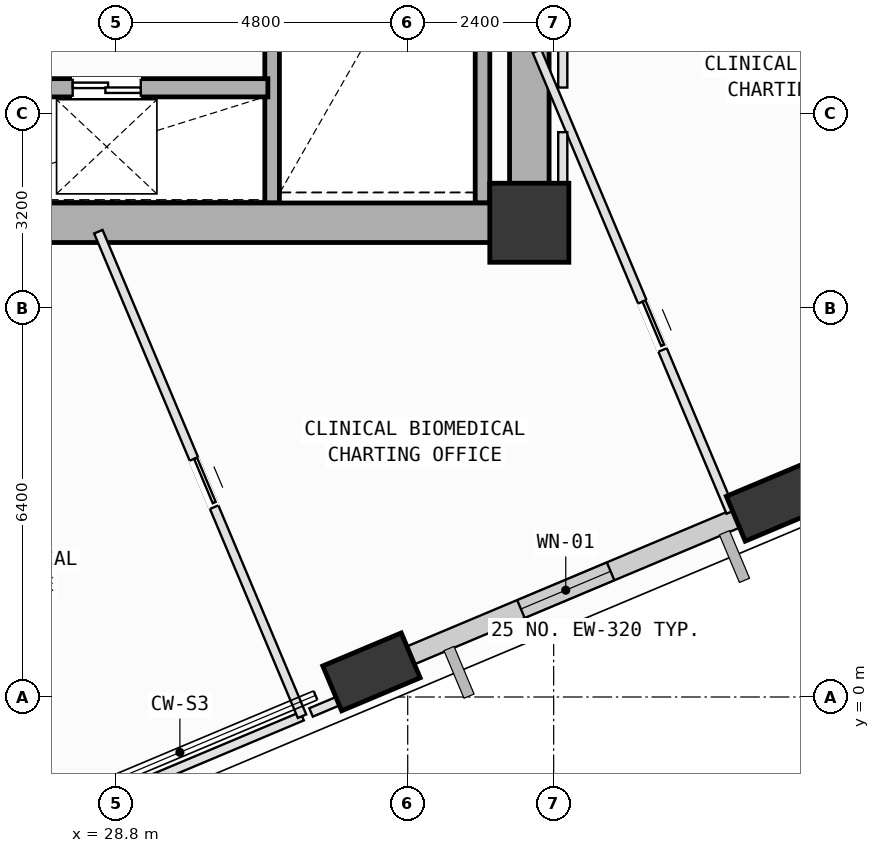
"""IFC4 building model, lengths in metres.
Left out: names, types, materials, properties, quantities, classifications, styles, units other than length and angle.
Written with IfcOpenShell. Run it as: python <this file> out.ifc"""

import sys

from ifc_helpers import new_model, si_unit, direction, frame, frame_2d, origin, origin_2d, place, context, subcontext, project, spatial, rectangle, extrude, element, fill, save


model = new_model("IFC4")
c1 = context("Model", 3, precision=1e-05, world=origin(), true_north=direction((0.0, 1.0)))
c2 = subcontext(c1, "Body", "Model", "MODEL_VIEW")
j1 = project(units=[si_unit("LENGTHUNIT", "METRE"), si_unit("PLANEANGLEUNIT", "RADIAN")], contexts=[c1])
p1 = place(None, origin())
s1 = spatial("IfcSite", under=j1, at=p1, CompositionType="ELEMENT")
p2 = place(p1, origin())
s2 = spatial("IfcBuilding", under=s1, at=p2, CompositionType="ELEMENT")
p3 = place(p2, frame((0.0, 0.0, 120.4)))
s3 = spatial("IfcBuildingStorey", under=s2, at=p3, CompositionType="ELEMENT", Elevation=120.4)
p4 = place(p3, frame((35.6, 7.8, 0.0), z_axis=(0.0, 0.0, 1.0), x_axis=(1.0, 0.0, 0.0)))
e1 = element("IfcColumn", 1, at=p4, inside=s3, PredefinedType="COLUMN", context=c2, shape_type="SweptSolid", body=[
    extrude(rectangle(XDim=1.3, YDim=1.3, at=origin_2d()), origin(), (0.0, 0.0, 1.0), 4.0),
])
p5 = place(p3, frame((33.004, 0.413, 0.002), z_axis=(0.100592771418, -0.001641090531, 0.994926329514), x_axis=(-0.370460704435, 0.928029591596, 0.038986453956)))
e2 = element("IfcColumn", 2, at=p5, inside=s3, PredefinedType="COLUMN", context=c2, shape_type="SweptSolid", body=[
    extrude(rectangle(XDim=1.4, YDim=0.8, at=origin_2d()), origin(), (0.0, 0.0, 1.0), 4.017),
])
p6 = place(p3, frame((39.641, 3.204, 0.002), z_axis=(0.08893172908, 0.025669760377, 0.995706890086), x_axis=(-0.626372223707, 0.778698418388, 0.035869354176)))
e3 = element("IfcColumn", 3, at=p6, inside=s3, PredefinedType="COLUMN", context=c2, shape_type="SweptSolid", body=[
    extrude(rectangle(XDim=1.4, YDim=0.8, at=origin_2d()), origin(), (0.0, 0.0, 1.0), 4.014),
])
p7 = place(p3, frame((39.354, 3.083, 0.0), z_axis=(0.0, 0.0, 1.0), x_axis=(-0.921860032261, -0.387523006956, 0.0)))
e4 = element("IfcWall", 4, at=p7, inside=s3, PredefinedType="SOLIDWALL", context=c2, shape_type="SweptSolid", body=[
    extrude(rectangle(XDim=6.214, YDim=0.32, at=frame_2d((3.107, 0.0))), origin(), (0.0, 0.0, 1.0), 3.165),
])
p8 = place(p7, frame((2.622, 0.0, 0.75)))
e5 = element("IfcOpeningElement", 5, at=p8, cuts=e4, PredefinedType="OPENING", context=c2, shape_type="SweptSolid", body=[
    extrude(rectangle(XDim=1.6, YDim=1.95, at=frame_2d((0.8, 0.975))), frame((0.0, 0.17, 0.0), z_axis=(0.0, -1.0, 0.0), x_axis=(1.0, 0.0, 0.0)), (0.0, 0.0, 1.0), 0.34),
])
for number, where, z_axis, x_axis in (
    (6, (34.83, 15.12, 0.0), (0.0, 0.0, 1.0), (0.0, -1.0, 0.0)),
    (7, (31.37, 8.125, 0.0), (0.0, 0.0, 1.0), (0.0, 1.0, 0.0)),
):
    element("IfcWall", number, at=place(p3, frame(where, z_axis=z_axis, x_axis=x_axis)), inside=s3, PredefinedType="SOLIDWALL", context=c2, shape_type="SweptSolid", body=[
        extrude(rectangle(XDim=6.995, YDim=0.24, at=frame_2d((3.498, 0.0))), origin(), (0.0, 0.0, 1.0), 3.78),
    ])
p9 = place(p3, frame((24.8, 7.8, 0.0), z_axis=(0.0, 0.0, 1.0), x_axis=(1.0, 0.0, 0.0)))
e8 = element("IfcWall", 8, at=p9, inside=s3, PredefinedType="SHEAR", context=c2, shape_type="SweptSolid", body=[
    extrude(rectangle(XDim=10.8, YDim=0.65, at=frame_2d((5.4, 0.0))), origin(), (0.0, 0.0, 1.0), 3.78),
])
p10 = place(p3, frame((35.6, 7.8, 0.0), z_axis=(0.0, 0.0, 1.0), x_axis=(0.0, 1.0, 0.0)))
e9 = element("IfcWall", 9, at=p10, inside=s3, PredefinedType="SHEAR", context=c2, shape_type="SweptSolid", body=[
    extrude(rectangle(XDim=9.0, YDim=0.65, at=frame_2d((4.5, 0.0))), origin(), (0.0, 0.0, 1.0), 3.78),
])
p11 = place(p3, frame((25.85, 10.02, 0.0), z_axis=(0.0, 0.0, 1.0), x_axis=(1.0, 0.0, 0.0)))
e10 = element("IfcWall", 10, at=p11, inside=s3, PredefinedType="SOLIDWALL", context=c2, shape_type="SweptSolid", body=[
    extrude(rectangle(XDim=5.45, YDim=0.3, at=frame_2d((2.725, 0.0))), origin(), (0.0, 0.0, 1.0), 3.78),
])
p12 = place(p11, frame((0.34, 0.0, 0.0)))
e11 = element("IfcOpeningElement", 11, at=p12, cuts=e10, PredefinedType="OPENING", context=c2, shape_type="SweptSolid", body=[
    extrude(rectangle(XDim=1.12, YDim=2.15, at=frame_2d((0.56, 1.075))), frame((0.0, 0.16, 0.0), z_axis=(0.0, -1.0, 0.0), x_axis=(1.0, 0.0, 0.0)), (0.0, 0.0, 1.0), 0.32),
])
p13 = place(p11, frame((2.24, 0.0, 0.0)))
e12 = element("IfcOpeningElement", 12, at=p13, cuts=e10, PredefinedType="OPENING", context=c2, shape_type="SweptSolid", body=[
    extrude(rectangle(XDim=1.12, YDim=2.15, at=frame_2d((0.56, 1.075))), frame((0.0, 0.16, 0.0), z_axis=(0.0, -1.0, 0.0), x_axis=(1.0, 0.0, 0.0)), (0.0, 0.0, 1.0), 0.32),
])
p14 = place(p3, frame((31.862, -0.316, 0.0), z_axis=(0.0, 0.0, 1.0), x_axis=(-0.921871891621, -0.387494794081, 0.0)))
e13 = element("IfcWall", 13, at=p14, inside=s3, PredefinedType="PARTITIONING", context=c2, shape_type="SweptSolid", body=[
    extrude(rectangle(XDim=6.155, YDim=0.15, at=frame_2d((3.078, 0.0))), origin(), (0.0, 0.0, 1.0), 3.165),
])
p15 = place(p3, frame((28.512, 7.653, 0.0), z_axis=(0.0, 0.0, 1.0), x_axis=(0.387539276189, -0.921853192982, 0.0)))
e14 = element("IfcWall", 14, at=p15, inside=s3, PredefinedType="PARTITIONING", context=c2, shape_type="SweptSolid", body=[
    extrude(rectangle(XDim=8.645, YDim=0.15, at=frame_2d((4.322, 0.0))), origin(), (0.0, 0.0, 1.0), 3.78),
])
p16 = place(p15, frame((4.055, 0.0, 0.0)))
e15 = element("IfcOpeningElement", 15, at=p16, cuts=e14, PredefinedType="OPENING", context=c2, shape_type="SweptSolid", body=[
    extrude(rectangle(XDim=0.86, YDim=2.06, at=frame_2d((0.43, 1.03))), frame((0.0, 0.085, 0.0), z_axis=(0.0, -1.0, 0.0), x_axis=(1.0, 0.0, 0.0)), (0.0, 0.0, 1.0), 0.17),
])
p17 = place(p3, frame((35.725, 10.623, 0.0), z_axis=(0.0, 0.0, 1.0), x_axis=(0.387581758341, -0.921835332693, 0.0)))
e16 = element("IfcWall", 16, at=p17, inside=s3, PredefinedType="PARTITIONING", context=c2, shape_type="SweptSolid", body=[
    extrude(rectangle(XDim=8.223, YDim=0.15, at=frame_2d((4.111, 0.0))), origin(), (0.0, 0.0, 1.0), 3.78),
])
p18 = place(p17, frame((4.472, 0.0, 0.0)))
e17 = element("IfcOpeningElement", 17, at=p18, cuts=e16, PredefinedType="OPENING", context=c2, shape_type="SweptSolid", body=[
    extrude(rectangle(XDim=0.86, YDim=2.06, at=frame_2d((0.43, 1.03))), frame((0.0, 0.085, 0.0), z_axis=(0.0, -1.0, 0.0), x_axis=(1.0, 0.0, 0.0)), (0.0, 0.0, 1.0), 0.17),
])
p19 = place(p3, frame((33.715, 0.463, 0.0), z_axis=(0.0, 0.0, 1.0), x_axis=(-0.92185387487, -0.387537654155, 0.0)))
e18 = element("IfcWall", 18, at=p19, inside=s3, PredefinedType="PARTITIONING", context=c2, shape_type="SweptSolid", body=[
    extrude(rectangle(XDim=1.85, YDim=0.15, at=frame_2d((0.925, 0.0))), origin(), (0.0, 0.0, 1.0), 3.165),
])
p20 = place(p3, frame((35.6, 7.5, 0.0), z_axis=(0.0, 0.0, 1.0), x_axis=(1.0, 0.0, 0.0)))
e19 = element("IfcWall", 19, at=p20, inside=s3, PredefinedType="PARTITIONING", context=c2, shape_type="SweptSolid", body=[
    extrude(rectangle(XDim=0.55, YDim=0.15, at=frame_2d((0.275, 0.0))), origin(), (0.0, 0.0, 1.0), 2.965),
])
p21 = place(p3, frame((36.15, 7.5, 0.0), z_axis=(0.0, 0.0, 1.0), x_axis=(0.0, 1.0, 0.0)))
e20 = element("IfcWall", 20, at=p21, inside=s3, PredefinedType="PARTITIONING", context=c2, shape_type="SweptSolid", body=[
    extrude(rectangle(XDim=1.79, YDim=0.15, at=frame_2d((0.895, 0.0))), origin(), (0.0, 0.0, 1.0), 3.78),
])
p22 = place(p3, frame((40.357, 3.255, 0.0), z_axis=(0.0, 0.0, 1.0), x_axis=(-0.921987382079, -0.387219921087, 0.0)))
e21 = element("IfcWall", 21, at=p22, inside=s3, PredefinedType="PARTITIONING", context=c2, shape_type="SweptSolid", body=[
    extrude(rectangle(XDim=0.991, YDim=0.15, at=frame_2d((0.496, 0.0))), origin(), (0.0, 0.0, 1.0), 3.165),
])
p23 = place(p3, frame((36.15, 10.024, 0.0), z_axis=(0.0, 0.0, 1.0), x_axis=(0.0, 1.0, 0.0)))
e22 = element("IfcWall", 22, at=p23, inside=s3, PredefinedType="PARTITIONING", context=c2, shape_type="SweptSolid", body=[
    extrude(rectangle(XDim=6.316, YDim=0.15, at=frame_2d((3.158, 0.0))), origin(), (0.0, 0.0, 1.0), 3.78),
])
p24 = place(p8, origin())
e23 = element("IfcWindow", 23, at=p24, inside=s3, PartitioningType="SINGLE_PANEL", PredefinedType="WINDOW", context=c2, shape_type="SweptSolid", body=[
    extrude(rectangle(XDim=1.6, YDim=1.95, at=frame_2d((0.8, 0.975))), frame((0.0, 0.03, 0.0), z_axis=(0.0, -1.0, 0.0), x_axis=(1.0, 0.0, 0.0)), (0.0, 0.0, 1.0), 0.06),
])
fill(e5, e23)
p25 = place(p13, origin())
e24 = element("IfcDoor", 24, at=p25, inside=s3, OperationType="DOUBLE_DOOR_SLIDING", PredefinedType="DOOR", context=c2, shape_type="SweptSolid", body=[
    extrude(rectangle(XDim=1.12, YDim=2.15, at=frame_2d((0.56, 1.075))), frame((0.0, 0.025, 0.0), z_axis=(0.0, -1.0, 0.0), x_axis=(1.0, 0.0, 0.0)), (0.0, 0.0, 1.0), 0.05),
])
fill(e12, e24)
p26 = place(p18, origin())
e25 = element("IfcDoor", 25, at=p26, inside=s3, OperationType="SLIDING_TO_LEFT", PredefinedType="DOOR", context=c2, shape_type="SweptSolid", body=[
    extrude(rectangle(XDim=0.86, YDim=2.06, at=frame_2d((0.43, 1.03))), frame((0.0, 0.025, 0.0), z_axis=(0.0, -1.0, 0.0), x_axis=(1.0, 0.0, 0.0)), (0.0, 0.0, 1.0), 0.05),
])
fill(e17, e25)
p27 = place(p16, origin())
e26 = element("IfcDoor", 26, at=p27, inside=s3, OperationType="SLIDING_TO_LEFT", PredefinedType="DOOR", context=c2, shape_type="SweptSolid", body=[
    extrude(rectangle(XDim=0.86, YDim=2.06, at=frame_2d((0.43, 1.03))), frame((0.0, 0.025, 0.0), z_axis=(0.0, -1.0, 0.0), x_axis=(1.0, 0.0, 0.0)), (0.0, 0.0, 1.0), 0.05),
])
fill(e15, e26)
save(model, sys.argv[1])
